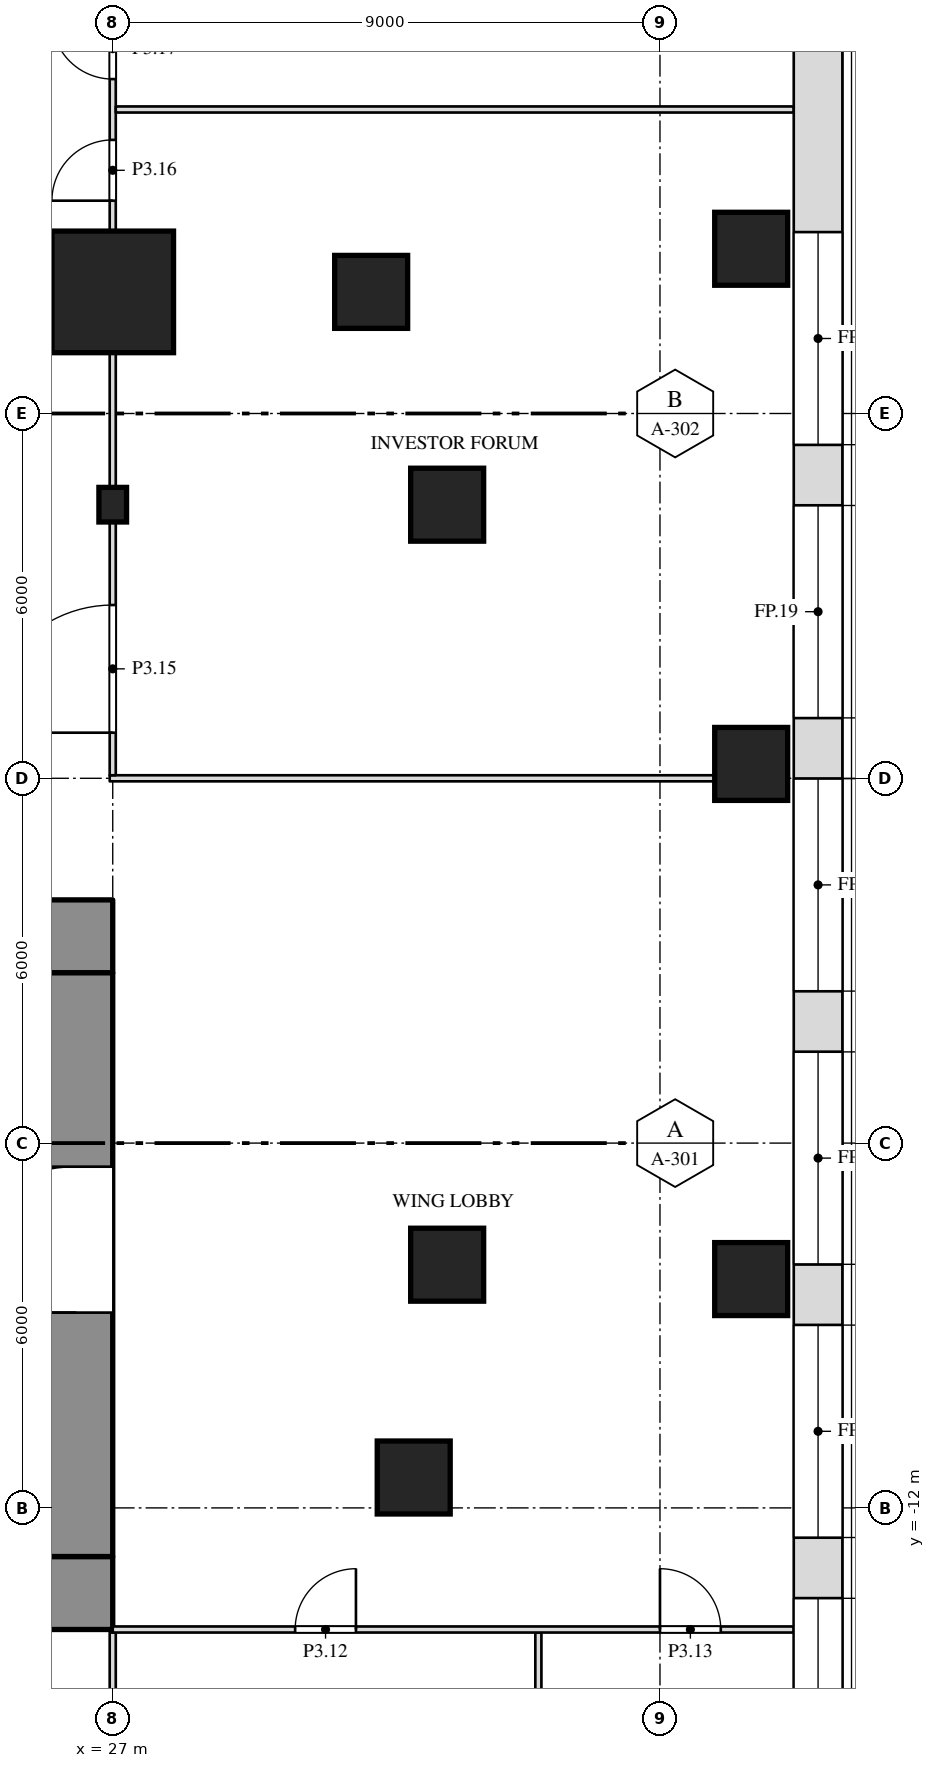
"""IFC4 building model, lengths in metres.
Left out: names, types, materials, properties, quantities, classifications, styles, units other than length and angle.
Written with IfcOpenShell. Run it as: python <this file> out.ifc"""

import sys

from ifc_helpers import new_model, si_unit, direction, frame, frame_2d, origin, origin_2d, place, context, subcontext, project, spatial, rectangle, i_section, extrude, element, fill, save


model = new_model("IFC4")
c1 = context("Model", 3, precision=1e-05, world=origin(), true_north=direction((0.0, 1.0)))
c2 = subcontext(c1, "Body", "Model", "MODEL_VIEW")
j1 = project(units=[si_unit("LENGTHUNIT", "METRE"), si_unit("PLANEANGLEUNIT", "RADIAN")], contexts=[c1])
p1 = place(None, origin())
s1 = spatial("IfcSite", under=j1, at=p1, CompositionType="ELEMENT")
p2 = place(p1, origin())
s2 = spatial("IfcBuilding", under=s1, at=p2, CompositionType="ELEMENT")
p3 = place(p2, frame((0.0, 0.0, 21.0)))
s3 = spatial("IfcBuildingStorey", under=s2, at=p3, CompositionType="ELEMENT", Elevation=21.0)
for number, where, z_axis, x_axis in (
    (1, (31.95, -11.5, 0.0), (0.0, 0.0, 1.0), (1.0, 0.0, 0.0)),
    (2, (37.5, -8.236, 0.0), (0.0, 0.0, 1.0), (1.0, 0.0, 0.0)),
    (3, (32.5, -8.0, 0.0), (0.0, 0.0, 1.0), (1.0, 0.0, 0.0)),
    (4, (37.5, 0.236, 0.0), (0.0, 0.0, 1.0), (1.0, 0.0, 0.0)),
):
    element("IfcColumn", number, at=place(p3, frame(where, z_axis=z_axis, x_axis=x_axis)), inside=s3, PredefinedType="COLUMN", context=c2, shape_type="SweptSolid", body=[
        extrude(rectangle(XDim=1.2, YDim=1.2, at=origin_2d()), origin(), (0.0, 0.0, 1.0), 6.0),
    ])
p4 = place(p3, frame((27.0, 4.5, 0.0), z_axis=(0.0, 0.0, 1.0), x_axis=(1.0, 0.0, 0.0)))
e5 = element("IfcColumn", 5, at=p4, inside=s3, PredefinedType="COLUMN", context=c2, shape_type="SweptSolid", body=[
    extrude(i_section(OverallWidth=0.455, OverallDepth=0.569, WebThickness=0.078, FlangeThickness=0.125, at=origin_2d()), origin(), (0.0, 0.0, 1.0), 6.0),
])
p5 = place(p3, frame((32.5, 4.5, 0.0), z_axis=(0.0, 0.0, 1.0), x_axis=(1.0, 0.0, 0.0)))
e6 = element("IfcColumn", 6, at=p5, inside=s3, PredefinedType="COLUMN", context=c2, shape_type="SweptSolid", body=[
    extrude(rectangle(XDim=1.2, YDim=1.2, at=origin_2d()), origin(), (0.0, 0.0, 1.0), 6.0),
])
p6 = place(p3, frame((27.0, 8.0, 0.0), z_axis=(0.0, 0.0, 1.0), x_axis=(1.0, 0.0, 0.0)))
e7 = element("IfcColumn", 7, at=p6, inside=s3, PredefinedType="COLUMN", context=c2, shape_type="SweptSolid", body=[
    extrude(rectangle(XDim=2.0, YDim=2.0, at=origin_2d()), origin(), (0.0, 0.0, 1.0), 6.0),
])
for number, where, z_axis, x_axis in (
    (8, (31.25, 8.0, 0.0), (0.0, 0.0, 1.0), (1.0, 0.0, 0.0)),
    (9, (37.5, 8.709, 0.0), (0.0, 0.0, 1.0), (1.0, 0.0, 0.0)),
):
    element("IfcColumn", number, at=place(p3, frame(where, z_axis=z_axis, x_axis=x_axis)), inside=s3, PredefinedType="COLUMN", context=c2, shape_type="SweptSolid", body=[
        extrude(rectangle(XDim=1.2, YDim=1.2, at=origin_2d()), origin(), (0.0, 0.0, 1.0), 6.0),
    ])
p7 = place(p3, frame((-27.0, -2.6, 0.0), z_axis=(0.0, 0.0, 1.0), x_axis=(1.0, 0.0, 0.0)))
e10 = element("IfcWall", 10, at=p7, inside=s3, PredefinedType="SHEAR", context=c2, shape_type="SweptSolid", body=[
    extrude(rectangle(XDim=54.0, YDim=1.2, at=frame_2d((27.0, 0.0))), origin(), (0.0, 0.0, 1.0), 5.7),
])
p8 = place(p3, frame((-27.0, -13.4, 0.0), z_axis=(0.0, 0.0, 1.0), x_axis=(1.0, 0.0, 0.0)))
e11 = element("IfcWall", 11, at=p8, inside=s3, PredefinedType="SHEAR", context=c2, shape_type="SweptSolid", body=[
    extrude(rectangle(XDim=54.0, YDim=1.2, at=frame_2d((27.0, 0.0))), origin(), (0.0, 0.0, 1.0), 5.7),
])
p9 = place(p8, frame((16.45, 0.0, 0.0)))
e12 = element("IfcOpeningElement", 12, at=p9, cuts=e11, PredefinedType="OPENING", context=c2, shape_type="SweptSolid", body=[
    extrude(rectangle(XDim=1.0, YDim=2.1, at=frame_2d((0.5, 1.05))), frame((0.0, 0.612, 0.0), z_axis=(0.0, -1.0, 0.0), x_axis=(1.0, 0.0, 0.0)), (0.0, 0.0, 1.0), 1.224),
])
p10 = place(p8, frame((36.55, 0.0, 0.0)))
e13 = element("IfcOpeningElement", 13, at=p10, cuts=e11, PredefinedType="OPENING", context=c2, shape_type="SweptSolid", body=[
    extrude(rectangle(XDim=1.0, YDim=2.1, at=frame_2d((0.5, 1.05))), frame((0.0, 0.612, 0.0), z_axis=(0.0, -1.0, 0.0), x_axis=(1.0, 0.0, 0.0)), (0.0, 0.0, 1.0), 1.224),
])
p11 = place(p3, frame((26.4, -12.8, 0.0), z_axis=(0.0, 0.0, 1.0), x_axis=(0.0, 1.0, 0.0)))
e14 = element("IfcWall", 14, at=p11, inside=s3, PredefinedType="SHEAR", context=c2, shape_type="SweptSolid", body=[
    extrude(rectangle(XDim=9.6, YDim=1.2, at=frame_2d((4.8, 0.0))), origin(), (0.0, 0.0, 1.0), 5.7),
])
p12 = place(p11, frame((4.012, 0.0, 0.0)))
e15 = element("IfcOpeningElement", 15, at=p12, cuts=e14, PredefinedType="OPENING", context=c2, shape_type="SweptSolid", body=[
    extrude(rectangle(XDim=2.4, YDim=2.1, at=frame_2d((1.2, 1.05))), frame((0.0, 0.612, 0.0), z_axis=(0.0, -1.0, 0.0), x_axis=(1.0, 0.0, 0.0)), (0.0, 0.0, 1.0), 1.224),
])
p13 = place(p3, frame((27.0, -16.9, 0.0), z_axis=(0.0, 0.0, 1.0), x_axis=(0.0, 1.0, 0.0)))
e16 = element("IfcWall", 16, at=p13, inside=s3, PredefinedType="PARTITIONING", context=c2, shape_type="SweptSolid", body=[
    extrude(rectangle(XDim=2.85, YDim=0.1, at=frame_2d((1.425, 0.0))), origin(), (0.0, 0.0, 1.0), 5.088),
])
p14 = place(p3, frame((34.0, -27.05, 0.0), z_axis=(0.0, 0.0, 1.0), x_axis=(0.0, 1.0, 0.0)))
e17 = element("IfcWall", 17, at=p14, inside=s3, PredefinedType="PARTITIONING", context=c2, shape_type="SweptSolid", body=[
    extrude(rectangle(XDim=13.0, YDim=0.1, at=frame_2d((6.5, 0.0))), origin(), (0.0, 0.0, 1.0), 5.7),
])
p15 = place(p3, frame((27.0, -14.0, 0.0), z_axis=(0.0, 0.0, 1.0), x_axis=(1.0, 0.0, 0.0)))
e18 = element("IfcWall", 18, at=p15, inside=s3, PredefinedType="PARTITIONING", context=c2, shape_type="SweptSolid", body=[
    extrude(rectangle(XDim=11.2, YDim=0.1, at=frame_2d((5.6, 0.0))), origin(), (0.0, 0.0, 1.0), 5.7),
])
p16 = place(p15, frame((3.0, 0.0, 0.0)))
e19 = element("IfcOpeningElement", 19, at=p16, cuts=e18, PredefinedType="OPENING", context=c2, shape_type="SweptSolid", body=[
    extrude(rectangle(XDim=1.0, YDim=2.1, at=frame_2d((0.5, 1.05))), frame((0.0, 0.062, 0.0), z_axis=(0.0, -1.0, 0.0), x_axis=(1.0, 0.0, 0.0)), (0.0, 0.0, 1.0), 0.124),
])
p17 = place(p15, frame((9.0, 0.0, 0.0)))
e20 = element("IfcOpeningElement", 20, at=p17, cuts=e18, PredefinedType="OPENING", context=c2, shape_type="SweptSolid", body=[
    extrude(rectangle(XDim=1.0, YDim=2.1, at=frame_2d((0.5, 1.05))), frame((0.0, 0.062, 0.0), z_axis=(0.0, -1.0, 0.0), x_axis=(1.0, 0.0, 0.0)), (0.0, 0.0, 1.0), 0.124),
])
p18 = place(p3, frame((26.95, 0.0, 0.0), z_axis=(0.0, 0.0, 1.0), x_axis=(1.0, 0.0, 0.0)))
e21 = element("IfcWall", 21, at=p18, inside=s3, PredefinedType="PARTITIONING", context=c2, shape_type="SweptSolid", body=[
    extrude(rectangle(XDim=9.95, YDim=0.1, at=frame_2d((4.975, 0.0))), origin(), (0.0, 0.0, 1.0), 5.088),
])
p19 = place(p3, frame((27.0, 0.05, 0.0), z_axis=(0.0, 0.0, 1.0), x_axis=(0.0, 1.0, 0.0)))
e22 = element("IfcWall", 22, at=p19, inside=s3, PredefinedType="PARTITIONING", context=c2, shape_type="SweptSolid", body=[
    extrude(rectangle(XDim=4.166, YDim=0.1, at=frame_2d((2.083, 0.0))), origin(), (0.0, 0.0, 1.0), 5.088),
])
p20 = place(p19, frame((0.7, 0.0, 0.0)))
e23 = element("IfcOpeningElement", 23, at=p20, cuts=e22, PredefinedType="OPENING", context=c2, shape_type="SweptSolid", body=[
    extrude(rectangle(XDim=2.1, YDim=2.4, at=frame_2d((1.05, 1.2))), frame((0.0, 0.062, 0.0), z_axis=(0.0, -1.0, 0.0), x_axis=(1.0, 0.0, 0.0)), (0.0, 0.0, 1.0), 0.124),
])
p21 = place(p3, frame((27.0, 4.784, 0.0), z_axis=(0.0, 0.0, 1.0), x_axis=(0.0, 1.0, 0.0)))
e24 = element("IfcWall", 24, at=p21, inside=s3, PredefinedType="PARTITIONING", context=c2, shape_type="SweptSolid", body=[
    extrude(rectangle(XDim=2.216, YDim=0.1, at=frame_2d((1.108, 0.0))), origin(), (0.0, 0.0, 1.0), 5.088),
])
p22 = place(p3, frame((27.0, 9.0, 0.0), z_axis=(0.0, 0.0, 1.0), x_axis=(0.0, 1.0, 0.0)))
e25 = element("IfcWall", 25, at=p22, inside=s3, PredefinedType="PARTITIONING", context=c2, shape_type="SweptSolid", body=[
    extrude(rectangle(XDim=8.4, YDim=0.1, at=frame_2d((4.2, 0.0))), origin(), (0.0, 0.0, 1.0), 5.088),
])
p23 = place(p22, frame((0.5, 0.0, 0.0)))
e26 = element("IfcOpeningElement", 26, at=p23, cuts=e25, PredefinedType="OPENING", context=c2, shape_type="SweptSolid", body=[
    extrude(rectangle(XDim=1.0, YDim=2.1, at=frame_2d((0.5, 1.05))), frame((0.0, 0.062, 0.0), z_axis=(0.0, -1.0, 0.0), x_axis=(1.0, 0.0, 0.0)), (0.0, 0.0, 1.0), 0.124),
])
p24 = place(p22, frame((2.5, 0.0, 0.0)))
e27 = element("IfcOpeningElement", 27, at=p24, cuts=e25, PredefinedType="OPENING", context=c2, shape_type="SweptSolid", body=[
    extrude(rectangle(XDim=1.0, YDim=2.1, at=frame_2d((0.5, 1.05))), frame((0.0, 0.062, 0.0), z_axis=(0.0, -1.0, 0.0), x_axis=(1.0, 0.0, 0.0)), (0.0, 0.0, 1.0), 0.124),
])
p25 = place(p22, frame((4.6, 0.0, 0.0)))
e28 = element("IfcOpeningElement", 28, at=p25, cuts=e25, PredefinedType="OPENING", context=c2, shape_type="SweptSolid", body=[
    extrude(rectangle(XDim=1.8, YDim=2.1, at=frame_2d((0.9, 1.05))), frame((0.0, 0.062, 0.0), z_axis=(0.0, -1.0, 0.0), x_axis=(1.0, 0.0, 0.0)), (0.0, 0.0, 1.0), 0.124),
])
p26 = place(p3, frame((27.05, 11.0, 0.0), z_axis=(0.0, 0.0, 1.0), x_axis=(1.0, 0.0, 0.0)))
e29 = element("IfcWall", 29, at=p26, inside=s3, PredefinedType="PARTITIONING", context=c2, shape_type="SweptSolid", body=[
    extrude(rectangle(XDim=11.15, YDim=0.1, at=frame_2d((5.575, 0.0))), origin(), (0.0, 0.0, 1.0), 5.7),
])
p27 = place(p3, frame((38.6, -21.948, 0.0), z_axis=(0.0, 0.0, 1.0), x_axis=(0.0, 1.0, 0.0)))
e30 = element("IfcWall", 30, at=p27, inside=s3, PredefinedType="SOLIDWALL", context=c2, shape_type="SweptSolid", body=[
    extrude(rectangle(XDim=35.895, YDim=0.8, at=frame_2d((17.948, 0.0))), origin(), (0.0, 0.0, 1.0), 5.7),
])
p28 = place(p27, frame((4.964, 0.0, 1.0)))
e31 = element("IfcOpeningElement", 31, at=p28, cuts=e30, PredefinedType="OPENING", context=c2, shape_type="SweptSolid", body=[
    extrude(rectangle(XDim=3.5, YDim=4.0, at=frame_2d((1.75, 2.0))), frame((0.0, 0.412, 0.0), z_axis=(0.0, -1.0, 0.0), x_axis=(1.0, 0.0, 0.0)), (0.0, 0.0, 1.0), 0.824),
])
p29 = place(p27, frame((9.458, 0.0, 1.0)))
e32 = element("IfcOpeningElement", 32, at=p29, cuts=e30, PredefinedType="OPENING", context=c2, shape_type="SweptSolid", body=[
    extrude(rectangle(XDim=3.5, YDim=4.0, at=frame_2d((1.75, 2.0))), frame((0.0, 0.412, 0.0), z_axis=(0.0, -1.0, 0.0), x_axis=(1.0, 0.0, 0.0)), (0.0, 0.0, 1.0), 0.824),
])
p30 = place(p27, frame((13.951, 0.0, 1.0)))
e33 = element("IfcOpeningElement", 33, at=p30, cuts=e30, PredefinedType="OPENING", context=c2, shape_type="SweptSolid", body=[
    extrude(rectangle(XDim=3.5, YDim=4.0, at=frame_2d((1.75, 2.0))), frame((0.0, 0.412, 0.0), z_axis=(0.0, -1.0, 0.0), x_axis=(1.0, 0.0, 0.0)), (0.0, 0.0, 1.0), 0.824),
])
p31 = place(p27, frame((18.444, 0.0, 1.0)))
e34 = element("IfcOpeningElement", 34, at=p31, cuts=e30, PredefinedType="OPENING", context=c2, shape_type="SweptSolid", body=[
    extrude(rectangle(XDim=3.5, YDim=4.0, at=frame_2d((1.75, 2.0))), frame((0.0, 0.412, 0.0), z_axis=(0.0, -1.0, 0.0), x_axis=(1.0, 0.0, 0.0)), (0.0, 0.0, 1.0), 0.824),
])
p32 = place(p27, frame((22.938, 0.0, 1.0)))
e35 = element("IfcOpeningElement", 35, at=p32, cuts=e30, PredefinedType="OPENING", context=c2, shape_type="SweptSolid", body=[
    extrude(rectangle(XDim=3.5, YDim=4.0, at=frame_2d((1.75, 2.0))), frame((0.0, 0.412, 0.0), z_axis=(0.0, -1.0, 0.0), x_axis=(1.0, 0.0, 0.0)), (0.0, 0.0, 1.0), 0.824),
])
p33 = place(p27, frame((27.431, 0.0, 1.0)))
e36 = element("IfcOpeningElement", 36, at=p33, cuts=e30, PredefinedType="OPENING", context=c2, shape_type="SweptSolid", body=[
    extrude(rectangle(XDim=3.5, YDim=4.0, at=frame_2d((1.75, 2.0))), frame((0.0, 0.412, 0.0), z_axis=(0.0, -1.0, 0.0), x_axis=(1.0, 0.0, 0.0)), (0.0, 0.0, 1.0), 0.824),
])
p34 = place(p16, origin())
e37 = element("IfcDoor", 37, at=p34, inside=s3, OperationType="SINGLE_SWING_RIGHT", PredefinedType="DOOR", context=c2, shape_type="SweptSolid", body=[
    extrude(rectangle(XDim=1.0, YDim=2.1, at=frame_2d((0.5, 1.05))), frame((0.0, 0.025, 0.0), z_axis=(0.0, -1.0, 0.0), x_axis=(1.0, 0.0, 0.0)), (0.0, 0.0, 1.0), 0.05),
])
fill(e19, e37)
p35 = place(p17, origin())
e38 = element("IfcDoor", 38, at=p35, inside=s3, OperationType="SINGLE_SWING_LEFT", PredefinedType="DOOR", context=c2, shape_type="SweptSolid", body=[
    extrude(rectangle(XDim=1.0, YDim=2.1, at=frame_2d((0.5, 1.05))), frame((0.0, 0.025, 0.0), z_axis=(0.0, -1.0, 0.0), x_axis=(1.0, 0.0, 0.0)), (0.0, 0.0, 1.0), 0.05),
])
fill(e20, e38)
p36 = place(p20, origin())
e39 = element("IfcDoor", 39, at=p36, inside=s3, OperationType="DOUBLE_DOOR_SINGLE_SWING", PredefinedType="DOOR", context=c2, shape_type="SweptSolid", body=[
    extrude(rectangle(XDim=2.1, YDim=2.4, at=frame_2d((1.05, 1.2))), frame((0.0, 0.025, 0.0), z_axis=(0.0, -1.0, 0.0), x_axis=(1.0, 0.0, 0.0)), (0.0, 0.0, 1.0), 0.05),
])
fill(e23, e39)
p37 = place(p23, origin())
e40 = element("IfcDoor", 40, at=p37, inside=s3, OperationType="SINGLE_SWING_LEFT", PredefinedType="DOOR", context=c2, shape_type="SweptSolid", body=[
    extrude(rectangle(XDim=1.0, YDim=2.1, at=frame_2d((0.5, 1.05))), frame((0.0, 0.025, 0.0), z_axis=(0.0, -1.0, 0.0), x_axis=(1.0, 0.0, 0.0)), (0.0, 0.0, 1.0), 0.05),
])
fill(e26, e40)
p38 = place(p24, origin())
e41 = element("IfcDoor", 41, at=p38, inside=s3, OperationType="SINGLE_SWING_RIGHT", PredefinedType="DOOR", context=c2, shape_type="SweptSolid", body=[
    extrude(rectangle(XDim=1.0, YDim=2.1, at=frame_2d((0.5, 1.05))), frame((0.0, 0.025, 0.0), z_axis=(0.0, -1.0, 0.0), x_axis=(1.0, 0.0, 0.0)), (0.0, 0.0, 1.0), 0.05),
])
fill(e27, e41)
p39 = place(p28, origin())
e42 = element("IfcWindow", 42, at=p39, inside=s3, PartitioningType="SINGLE_PANEL", PredefinedType="WINDOW", context=c2, shape_type="SweptSolid", body=[
    extrude(rectangle(XDim=3.5, YDim=4.0, at=frame_2d((1.75, 2.0))), frame((0.0, 0.03, 0.0), z_axis=(0.0, -1.0, 0.0), x_axis=(1.0, 0.0, 0.0)), (0.0, 0.0, 1.0), 0.06),
])
fill(e31, e42)
p40 = place(p29, origin())
e43 = element("IfcWindow", 43, at=p40, inside=s3, PartitioningType="SINGLE_PANEL", PredefinedType="WINDOW", context=c2, shape_type="SweptSolid", body=[
    extrude(rectangle(XDim=3.5, YDim=4.0, at=frame_2d((1.75, 2.0))), frame((0.0, 0.03, 0.0), z_axis=(0.0, -1.0, 0.0), x_axis=(1.0, 0.0, 0.0)), (0.0, 0.0, 1.0), 0.06),
])
fill(e32, e43)
p41 = place(p30, origin())
e44 = element("IfcWindow", 44, at=p41, inside=s3, PartitioningType="SINGLE_PANEL", PredefinedType="WINDOW", context=c2, shape_type="SweptSolid", body=[
    extrude(rectangle(XDim=3.5, YDim=4.0, at=frame_2d((1.75, 2.0))), frame((0.0, 0.03, 0.0), z_axis=(0.0, -1.0, 0.0), x_axis=(1.0, 0.0, 0.0)), (0.0, 0.0, 1.0), 0.06),
])
fill(e33, e44)
p42 = place(p31, origin())
e45 = element("IfcWindow", 45, at=p42, inside=s3, PartitioningType="SINGLE_PANEL", PredefinedType="WINDOW", context=c2, shape_type="SweptSolid", body=[
    extrude(rectangle(XDim=3.5, YDim=4.0, at=frame_2d((1.75, 2.0))), frame((0.0, 0.03, 0.0), z_axis=(0.0, -1.0, 0.0), x_axis=(1.0, 0.0, 0.0)), (0.0, 0.0, 1.0), 0.06),
])
fill(e34, e45)
p43 = place(p32, origin())
e46 = element("IfcWindow", 46, at=p43, inside=s3, PartitioningType="SINGLE_PANEL", PredefinedType="WINDOW", context=c2, shape_type="SweptSolid", body=[
    extrude(rectangle(XDim=3.5, YDim=4.0, at=frame_2d((1.75, 2.0))), frame((0.0, 0.03, 0.0), z_axis=(0.0, -1.0, 0.0), x_axis=(1.0, 0.0, 0.0)), (0.0, 0.0, 1.0), 0.06),
])
fill(e35, e46)
p44 = place(p33, origin())
e47 = element("IfcWindow", 47, at=p44, inside=s3, PartitioningType="SINGLE_PANEL", PredefinedType="WINDOW", context=c2, shape_type="SweptSolid", body=[
    extrude(rectangle(XDim=3.5, YDim=4.0, at=frame_2d((1.75, 2.0))), frame((0.0, 0.03, 0.0), z_axis=(0.0, -1.0, 0.0), x_axis=(1.0, 0.0, 0.0)), (0.0, 0.0, 1.0), 0.06),
])
fill(e36, e47)
p45 = place(p12, origin())
e48 = element("IfcDoor", 48, at=p45, inside=s3, OperationType="DOUBLE_DOOR_SINGLE_SWING", PredefinedType="DOOR", context=c2, shape_type="SweptSolid", body=[
    extrude(rectangle(XDim=2.4, YDim=2.1, at=frame_2d((1.2, 1.05))), frame((0.0, 0.025, 0.0), z_axis=(0.0, -1.0, 0.0), x_axis=(1.0, 0.0, 0.0)), (0.0, 0.0, 1.0), 0.05),
])
fill(e15, e48)
save(model, sys.argv[1])
